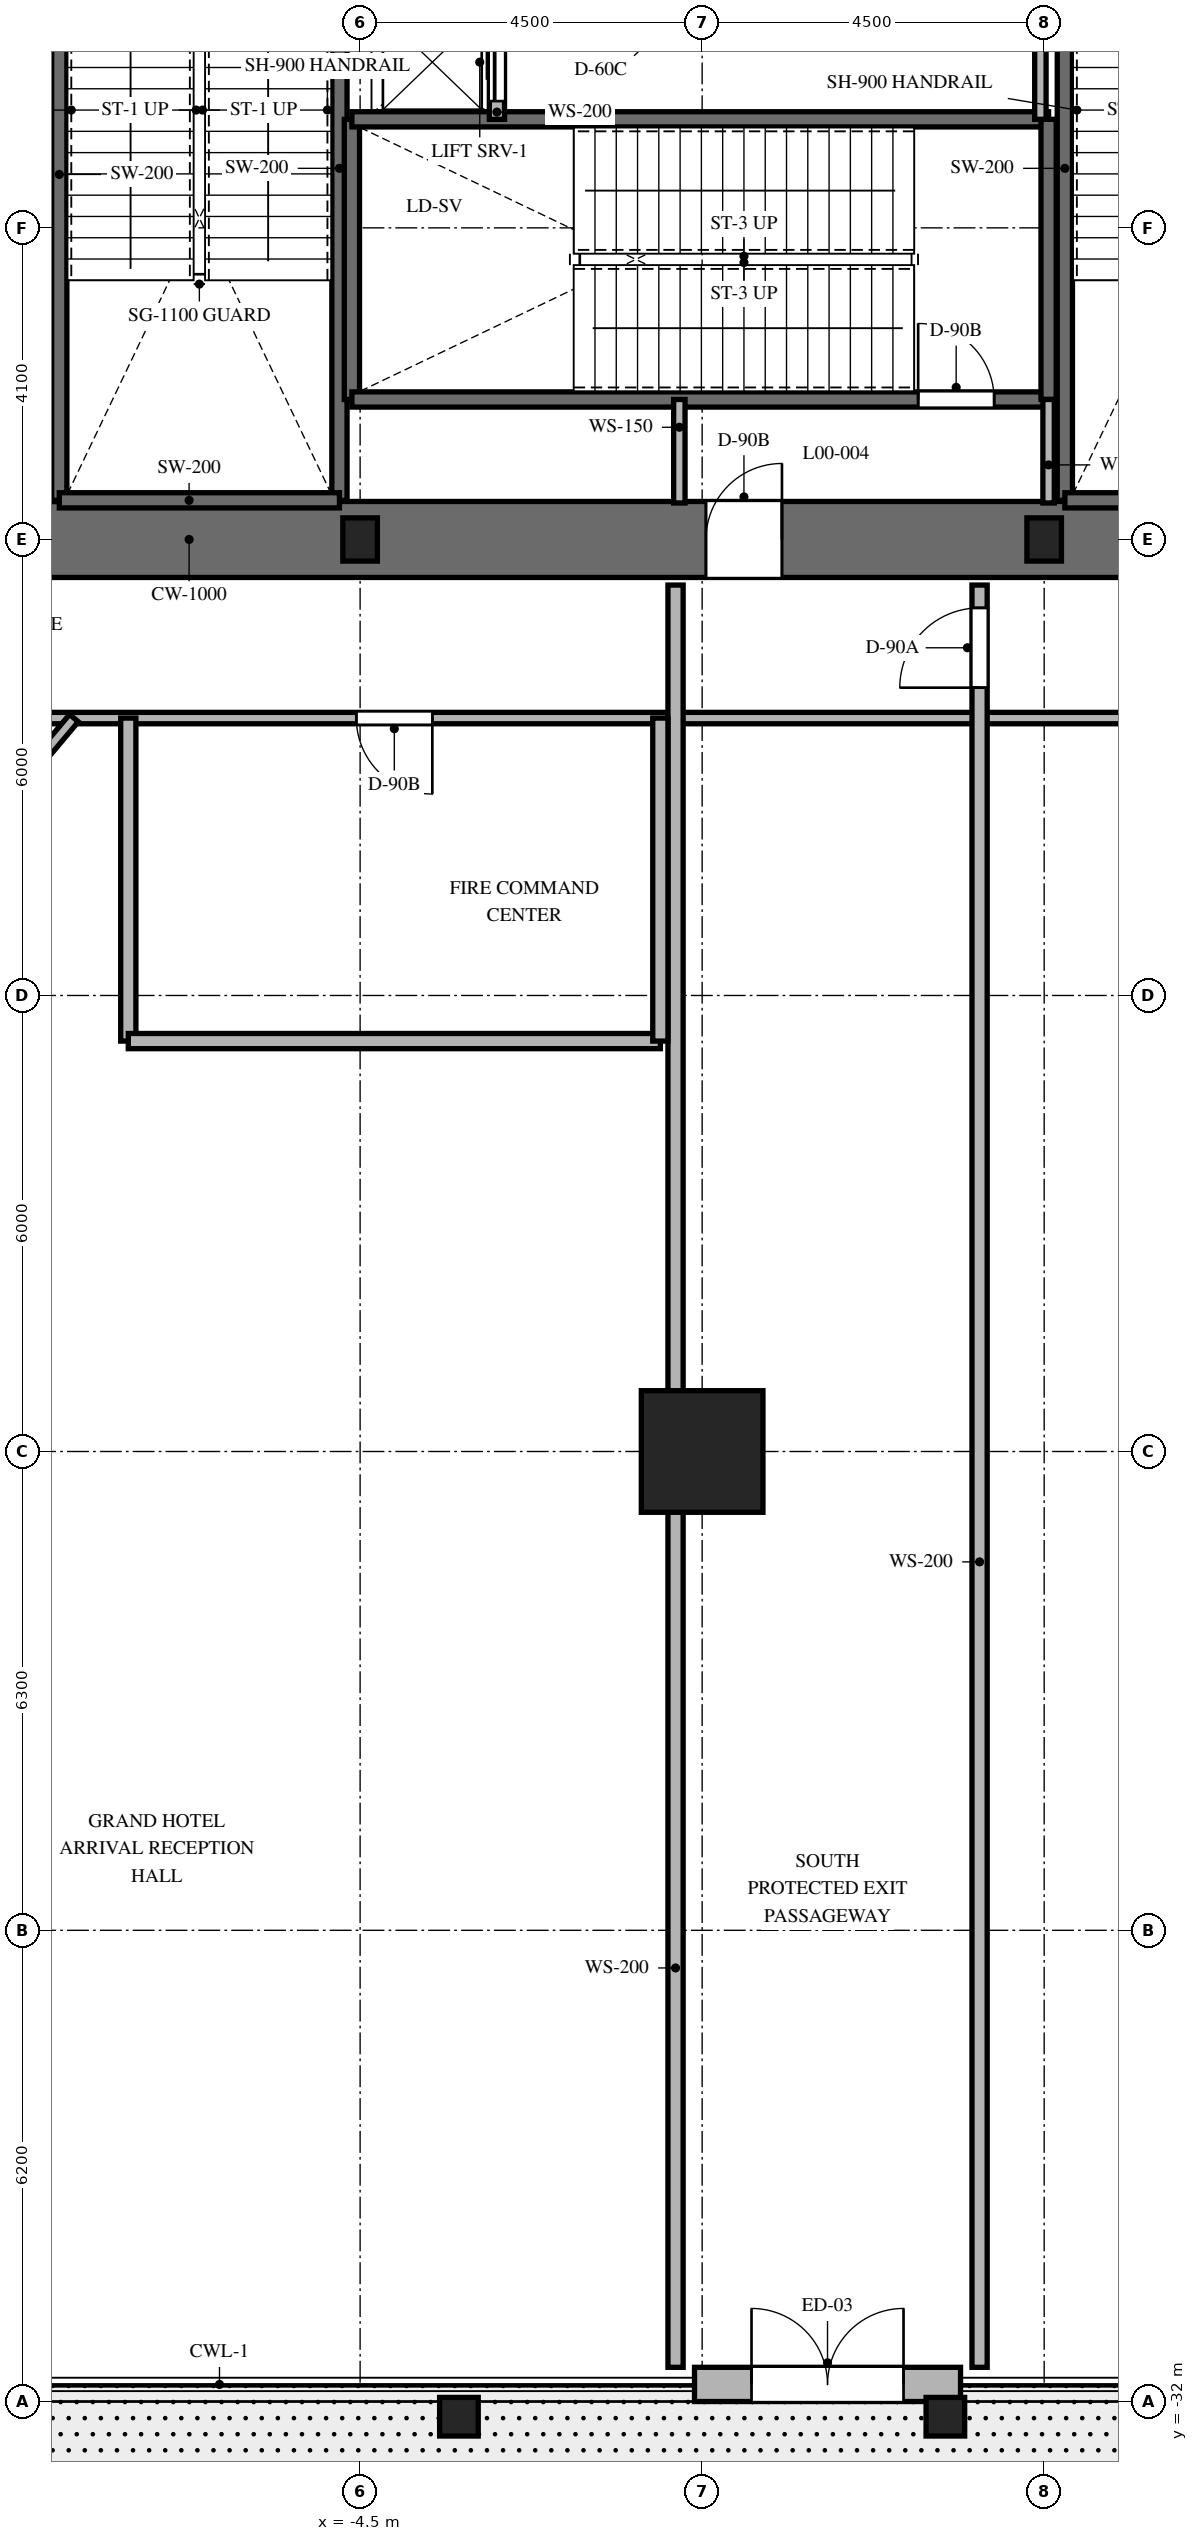
"""IFC4 building model, lengths in metres.
Left out: names, types, materials, properties, quantities, classifications, styles, units other than length and angle.
Written with IfcOpenShell. Run it as: python <this file> out.ifc"""

import sys

from ifc_helpers import new_model, si_unit, direction, frame, frame_2d, origin, origin_2d, place, context, subcontext, project, spatial, rectangle, hollow_circle, i_section, extrude, element, fill, save


model = new_model("IFC4")
c1 = context("Model", 3, precision=1e-05, world=origin(), true_north=direction((0.0, 1.0)))
c2 = subcontext(c1, "Body", "Model", "MODEL_VIEW")
j1 = project(units=[si_unit("LENGTHUNIT", "METRE"), si_unit("PLANEANGLEUNIT", "RADIAN")], contexts=[c1])
p1 = place(None, origin())
s1 = spatial("IfcSite", under=j1, at=p1, CompositionType="ELEMENT")
p2 = place(p1, origin())
s2 = spatial("IfcBuilding", under=s1, at=p2, CompositionType="ELEMENT")
p3 = place(p2, origin())
s3 = spatial("IfcBuildingStorey", under=s2, at=p3, CompositionType="ELEMENT", Elevation=0.0)
for number, where, z_axis, x_axis in (
    (1, (-3.2, -32.2, 0.0), (0.0, 0.0, 1.0), (1.0, 0.0, 0.0)),
    (2, (3.2, -32.2, 0.0), (0.0, 0.0, 1.0), (1.0, 0.0, 0.0)),
):
    element("IfcColumn", number, at=place(p3, frame(where, z_axis=z_axis, x_axis=x_axis)), inside=s3, PredefinedType="COLUMN", context=c2, shape_type="SweptSolid", body=[
        extrude(hollow_circle(Radius=0.254, WallThickness=0.02, at=origin_2d()), origin(), (0.0, 0.0, 1.0), 5.2),
    ])
p4 = place(p3, frame((-9.5, -7.5, 0.0), z_axis=(0.0, 0.0, 1.0), x_axis=(1.0, 0.0, 0.0)))
e3 = element("IfcWall", 3, at=p4, inside=s3, PredefinedType="SHEAR", context=c2, shape_type="SweptSolid", body=[
    extrude(rectangle(XDim=19.0, YDim=1.0, at=frame_2d((9.5, 0.0))), origin(), (0.0, 0.0, 1.0), 6.0),
])
p5 = place(p4, frame((9.55, 0.0, 0.0)))
e4 = element("IfcOpeningElement", 4, at=p5, cuts=e3, PredefinedType="OPENING", context=c2, shape_type="SweptSolid", body=[
    extrude(rectangle(XDim=1.0, YDim=2.15, at=frame_2d((0.5, 1.075))), frame((0.0, 0.51, 0.0), z_axis=(0.0, -1.0, 0.0), x_axis=(1.0, 0.0, 0.0)), (0.0, 0.0, 1.0), 1.02),
])
p6 = place(p3, frame((-9.0, -7.0, 0.0), z_axis=(0.0, 0.0, 1.0), x_axis=(0.0, 1.0, 0.0)))
e5 = element("IfcWall", 5, at=p6, inside=s3, PredefinedType="SHEAR", context=c2, shape_type="SweptSolid", body=[
    extrude(rectangle(XDim=14.0, YDim=1.0, at=frame_2d((7.0, 0.0))), origin(), (0.0, 0.0, 1.0), 6.0),
])
p7 = place(p6, frame((10.125, 0.0, 0.0)))
e6 = element("IfcOpeningElement", 6, at=p7, cuts=e5, PredefinedType="OPENING", context=c2, shape_type="SweptSolid", body=[
    extrude(rectangle(XDim=1.05, YDim=2.15, at=frame_2d((0.525, 1.075))), frame((0.0, 0.51, 0.0), z_axis=(0.0, -1.0, 0.0), x_axis=(1.0, 0.0, 0.0)), (0.0, 0.0, 1.0), 1.02),
])
for number, where, z_axis, x_axis in (
    (7, (-8.458, -6.985, 0.0), (0.0, 0.0, 1.0), (0.0, 1.0, 0.0)),
    (8, (-4.772, -6.985, 0.0), (0.0, 0.0, 1.0), (0.0, 1.0, 0.0)),
):
    element("IfcWall", number, at=place(p3, frame(where, z_axis=z_axis, x_axis=x_axis)), inside=s3, PredefinedType="SHEAR", context=c2, shape_type="SweptSolid", body=[
        extrude(rectangle(XDim=9.143, YDim=0.2, at=frame_2d((4.572, 0.0))), origin(), (0.0, 0.0, 1.0), 6.0),
    ])
p8 = place(p3, frame((-8.458, -6.985, 0.0), z_axis=(0.0, 0.0, 1.0), x_axis=(1.0, 0.0, 0.0)))
e9 = element("IfcWall", 9, at=p8, inside=s3, PredefinedType="SHEAR", context=c2, shape_type="SweptSolid", body=[
    extrude(rectangle(XDim=3.686, YDim=0.2, at=frame_2d((1.843, 0.0))), origin(), (0.0, 0.0, 1.0), 6.0),
])
p9 = place(p3, frame((4.772, -6.985, 0.0), z_axis=(0.0, 0.0, 1.0), x_axis=(0.0, 1.0, 0.0)))
e10 = element("IfcWall", 10, at=p9, inside=s3, PredefinedType="SHEAR", context=c2, shape_type="SweptSolid", body=[
    extrude(rectangle(XDim=9.143, YDim=0.2, at=frame_2d((4.572, 0.0))), origin(), (0.0, 0.0, 1.0), 6.0),
])
for number, where, z_axis, x_axis in (
    (11, (4.772, -6.985, 0.0), (0.0, 0.0, 1.0), (1.0, 0.0, 0.0)),
    (12, (-4.608, -5.658, 0.0), (0.0, 0.0, 1.0), (0.0, 1.0, 0.0)),
):
    element("IfcWall", number, at=place(p3, frame(where, z_axis=z_axis, x_axis=x_axis)), inside=s3, PredefinedType="SHEAR", context=c2, shape_type="SweptSolid", body=[
        extrude(rectangle(XDim=3.686, YDim=0.2, at=frame_2d((1.843, 0.0))), origin(), (0.0, 0.0, 1.0), 6.0),
    ])
p10 = place(p3, frame((-4.608, -5.658, 0.0), z_axis=(0.0, 0.0, 1.0), x_axis=(1.0, 0.0, 0.0)))
e13 = element("IfcWall", 13, at=p10, inside=s3, PredefinedType="SHEAR", context=c2, shape_type="SweptSolid", body=[
    extrude(rectangle(XDim=9.166, YDim=0.2, at=frame_2d((4.583, 0.0))), origin(), (0.0, 0.0, 1.0), 6.0),
])
p11 = place(p10, frame((7.45, 0.0, 0.0)))
e14 = element("IfcOpeningElement", 14, at=p11, cuts=e13, PredefinedType="OPENING", context=c2, shape_type="SweptSolid", body=[
    extrude(rectangle(XDim=1.0, YDim=2.15, at=frame_2d((0.5, 1.075))), frame((0.0, 0.11, 0.0), z_axis=(0.0, -1.0, 0.0), x_axis=(1.0, 0.0, 0.0)), (0.0, 0.0, 1.0), 0.22),
])
p12 = place(p3, frame((-4.608, -1.972, 0.0), z_axis=(0.0, 0.0, 1.0), x_axis=(1.0, 0.0, 0.0)))
e15 = element("IfcWall", 15, at=p12, inside=s3, PredefinedType="SHEAR", context=c2, shape_type="SweptSolid", body=[
    extrude(rectangle(XDim=9.166, YDim=0.2, at=frame_2d((4.583, 0.0))), origin(), (0.0, 0.0, 1.0), 6.0),
])
p13 = place(p3, frame((4.558, -5.658, 0.0), z_axis=(0.0, 0.0, 1.0), x_axis=(0.0, 1.0, 0.0)))
e16 = element("IfcWall", 16, at=p13, inside=s3, PredefinedType="SHEAR", context=c2, shape_type="SweptSolid", body=[
    extrude(rectangle(XDim=3.686, YDim=0.2, at=frame_2d((1.843, 0.0))), origin(), (0.0, 0.0, 1.0), 6.0),
])
for number, where, z_axis, x_axis in (
    (17, (-4.5, -7.5, 0.0), (0.0, 0.0, 1.0), (1.0, 0.0, 0.0)),
    (18, (4.5, -7.5, 0.0), (0.0, 0.0, 1.0), (1.0, 0.0, 0.0)),
):
    element("IfcColumn", number, at=place(p3, frame(where, z_axis=z_axis, x_axis=x_axis)), inside=s3, PredefinedType="COLUMN", context=c2, shape_type="SweptSolid", body=[
        extrude(i_section(OverallWidth=0.454, OverallDepth=0.569, WebThickness=0.078, FlangeThickness=0.125, at=origin_2d()), origin(), (0.0, 0.0, 1.0), 6.0),
    ])
p14 = place(p3, frame((0.0, -19.5, 0.0), z_axis=(0.0, 0.0, 1.0), x_axis=(1.0, 0.0, 0.0)))
e19 = element("IfcColumn", 19, at=p14, inside=s3, PredefinedType="COLUMN", context=c2, shape_type="SweptSolid", body=[
    extrude(rectangle(XDim=1.6, YDim=1.6, at=origin_2d()), origin(), (0.0, 0.0, 1.0), 6.0),
])
p15 = place(p3, frame((-0.101, -31.775, 0.0), z_axis=(0.0, 0.0, 1.0), x_axis=(1.0, 0.0, 0.0)))
e20 = element("IfcWall", 20, at=p15, inside=s3, PredefinedType="SOLIDWALL", context=c2, shape_type="SweptSolid", body=[
    extrude(rectangle(XDim=3.5, YDim=0.45, at=frame_2d((1.75, 0.0))), origin(), (0.0, 0.0, 1.0), 4.65),
])
p16 = place(p15, frame((0.75, 0.0, 0.0)))
e21 = element("IfcOpeningElement", 21, at=p16, cuts=e20, PredefinedType="OPENING", context=c2, shape_type="SweptSolid", body=[
    extrude(rectangle(XDim=2.0, YDim=2.4, at=frame_2d((1.0, 1.2))), frame((0.0, 0.235, 0.0), z_axis=(0.0, -1.0, 0.0), x_axis=(1.0, 0.0, 0.0)), (0.0, 0.0, 1.0), 0.47),
])
for number, where, z_axis, x_axis in (
    (22, (-0.3, -7.02, 0.0), (0.0, 0.0, 1.0), (0.0, 1.0, 0.0)),
    (23, (4.558, -7.02, 0.0), (0.0, 0.0, 1.0), (0.0, 1.0, 0.0)),
):
    element("IfcWall", number, at=place(p3, frame(where, z_axis=z_axis, x_axis=x_axis)), inside=s3, PredefinedType="PARTITIONING", context=c2, shape_type="SweptSolid", body=[
        extrude(rectangle(XDim=1.362, YDim=0.15, at=frame_2d((0.681, 0.0))), origin(), (0.0, 0.0, 1.0), 5.68),
    ])
p17 = place(p3, frame((-2.7, -1.972, 0.0), z_axis=(0.0, 0.0, 1.0), x_axis=(0.0, 1.0, 0.0)))
e24 = element("IfcWall", 24, at=p17, inside=s3, PredefinedType="PARTITIONING", context=c2, shape_type="SweptSolid", body=[
    extrude(rectangle(XDim=1.472, YDim=0.2, at=frame_2d((0.736, 0.0))), origin(), (0.0, 0.0, 1.0), 5.68),
])
p18 = place(p17, frame((0.24, 0.0, 0.0)))
e25 = element("IfcOpeningElement", 25, at=p18, cuts=e24, PredefinedType="OPENING", context=c2, shape_type="SweptSolid", body=[
    extrude(rectangle(XDim=1.0, YDim=2.2, at=frame_2d((0.5, 1.1))), frame((0.0, 0.11, 0.0), z_axis=(0.0, -1.0, 0.0), x_axis=(1.0, 0.0, 0.0)), (0.0, 0.0, 1.0), 0.22),
])
p19 = place(p3, frame((4.45, -1.972, 0.0), z_axis=(0.0, 0.0, 1.0), x_axis=(0.0, 1.0, 0.0)))
e26 = element("IfcWall", 26, at=p19, inside=s3, PredefinedType="PARTITIONING", context=c2, shape_type="SweptSolid", body=[
    extrude(rectangle(XDim=4.222, YDim=0.15, at=frame_2d((2.111, 0.0))), origin(), (0.0, 0.0, 1.0), 5.68),
])
p20 = place(p3, frame((11.35, -9.85, 0.0), z_axis=(0.0, 0.0, 1.0), x_axis=(-1.0, 0.0, 0.0)))
e27 = element("IfcWall", 27, at=p20, inside=s3, PredefinedType="PARTITIONING", context=c2, shape_type="SweptSolid", body=[
    extrude(rectangle(XDim=22.7, YDim=0.15, at=frame_2d((11.35, 0.0))), origin(), (0.0, 0.0, 1.0), 4.722),
])
p21 = place(p20, frame((14.9, 0.0, 0.0)))
e28 = element("IfcOpeningElement", 28, at=p21, cuts=e27, PredefinedType="OPENING", context=c2, shape_type="SweptSolid", body=[
    extrude(rectangle(XDim=1.0, YDim=2.15, at=frame_2d((0.5, 1.075))), frame((0.0, 0.085, 0.0), z_axis=(0.0, -1.0, 0.0), x_axis=(1.0, 0.0, 0.0)), (0.0, 0.0, 1.0), 0.17),
])
p22 = place(p3, frame((-0.35, -31.55, 0.0), z_axis=(0.0, 0.0, 1.0), x_axis=(0.0, 1.0, 0.0)))
e29 = element("IfcWall", 29, at=p22, inside=s3, PredefinedType="PARTITIONING", context=c2, shape_type="SweptSolid", body=[
    extrude(rectangle(XDim=23.45, YDim=0.2, at=frame_2d((11.725, 0.0))), origin(), (0.0, 0.0, 1.0), 4.729),
])
p23 = place(p3, frame((3.65, -31.55, 0.0), z_axis=(0.0, 0.0, 1.0), x_axis=(0.0, 1.0, 0.0)))
e30 = element("IfcWall", 30, at=p23, inside=s3, PredefinedType="PARTITIONING", context=c2, shape_type="SweptSolid", body=[
    extrude(rectangle(XDim=23.45, YDim=0.2, at=frame_2d((11.725, 0.0))), origin(), (0.0, 0.0, 1.0), 4.729),
])
p24 = place(p23, frame((22.1, 0.0, 0.0)))
e31 = element("IfcOpeningElement", 31, at=p24, cuts=e30, PredefinedType="OPENING", context=c2, shape_type="SweptSolid", body=[
    extrude(rectangle(XDim=1.05, YDim=2.15, at=frame_2d((0.525, 1.075))), frame((0.0, 0.11, 0.0), z_axis=(0.0, -1.0, 0.0), x_axis=(1.0, 0.0, 0.0)), (0.0, 0.0, 1.0), 0.22),
])
p25 = place(p3, frame((-7.55, -14.1, 0.0), z_axis=(0.0, 0.0, 1.0), x_axis=(0.0, 1.0, 0.0)))
e32 = element("IfcWall", 32, at=p25, inside=s3, PredefinedType="PARTITIONING", context=c2, shape_type="SweptSolid", body=[
    extrude(rectangle(XDim=4.25, YDim=0.2, at=frame_2d((2.125, 0.0))), origin(), (0.0, 0.0, 1.0), 5.68),
])
p26 = place(p3, frame((-7.55, -14.1, 0.0), z_axis=(0.0, 0.0, 1.0), x_axis=(1.0, 0.0, 0.0)))
e33 = element("IfcWall", 33, at=p26, inside=s3, PredefinedType="PARTITIONING", context=c2, shape_type="SweptSolid", body=[
    extrude(rectangle(XDim=7.0, YDim=0.2, at=frame_2d((3.5, 0.0))), origin(), (0.0, 0.0, 1.0), 5.68),
])
p27 = place(p3, frame((-0.55, -14.1, 0.0), z_axis=(0.0, 0.0, 1.0), x_axis=(0.0, 1.0, 0.0)))
e34 = element("IfcWall", 34, at=p27, inside=s3, PredefinedType="PARTITIONING", context=c2, shape_type="SweptSolid", body=[
    extrude(rectangle(XDim=4.25, YDim=0.2, at=frame_2d((2.125, 0.0))), origin(), (0.0, 0.0, 1.0), 5.68),
])
p28 = place(p3, frame((-8.265, -9.85, 0.0), z_axis=(0.0, 0.0, 1.0), x_axis=(-0.642790692764, -0.766041856099, 0.0)))
e35 = element("IfcWall", 35, at=p28, inside=s3, PredefinedType="PARTITIONING", context=c2, shape_type="SweptSolid", body=[
    extrude(rectangle(XDim=23.784, YDim=0.15, at=frame_2d((11.892, 0.0))), origin(), (0.0, 0.0, 1.0), 4.67),
])
p29 = place(p16, origin())
e36 = element("IfcDoor", 36, at=p29, inside=s3, OperationType="DOUBLE_SWING_LEFT", PredefinedType="DOOR", context=c2, shape_type="SweptSolid", body=[
    extrude(rectangle(XDim=2.0, YDim=2.4, at=frame_2d((1.0, 1.2))), frame((0.0, 0.025, 0.0), z_axis=(0.0, -1.0, 0.0), x_axis=(1.0, 0.0, 0.0)), (0.0, 0.0, 1.0), 0.05),
])
fill(e21, e36)
p30 = place(p11, origin())
e37 = element("IfcDoor", 37, at=p30, inside=s3, OperationType="SINGLE_SWING_LEFT", PredefinedType="DOOR", context=c2, shape_type="SweptSolid", body=[
    extrude(rectangle(XDim=1.0, YDim=2.15, at=frame_2d((0.5, 1.075))), frame((0.0, 0.025, 0.0), z_axis=(0.0, -1.0, 0.0), x_axis=(1.0, 0.0, 0.0)), (0.0, 0.0, 1.0), 0.05),
])
fill(e14, e37)
p31 = place(p5, origin())
e38 = element("IfcDoor", 38, at=p31, inside=s3, OperationType="SINGLE_SWING_RIGHT", PredefinedType="DOOR", context=c2, shape_type="SweptSolid", body=[
    extrude(rectangle(XDim=1.0, YDim=2.15, at=frame_2d((0.5, 1.075))), frame((0.0, 0.025, 0.0), z_axis=(0.0, -1.0, 0.0), x_axis=(1.0, 0.0, 0.0)), (0.0, 0.0, 1.0), 0.05),
])
fill(e4, e38)
p32 = place(p18, origin())
e39 = element("IfcDoor", 39, at=p32, inside=s3, OperationType="SLIDING_TO_LEFT", PredefinedType="DOOR", context=c2, shape_type="SweptSolid", body=[
    extrude(rectangle(XDim=1.0, YDim=2.2, at=frame_2d((0.5, 1.1))), frame((0.0, 0.025, 0.0), z_axis=(0.0, -1.0, 0.0), x_axis=(1.0, 0.0, 0.0)), (0.0, 0.0, 1.0), 0.05),
])
fill(e25, e39)
p33 = place(p24, origin())
e40 = element("IfcDoor", 40, at=p33, inside=s3, OperationType="SINGLE_SWING_LEFT", PredefinedType="DOOR", context=c2, shape_type="SweptSolid", body=[
    extrude(rectangle(XDim=1.05, YDim=2.15, at=frame_2d((0.525, 1.075))), frame((0.0, 0.025, 0.0), z_axis=(0.0, -1.0, 0.0), x_axis=(1.0, 0.0, 0.0)), (0.0, 0.0, 1.0), 0.05),
])
fill(e31, e40)
p34 = place(p21, origin())
e41 = element("IfcDoor", 41, at=p34, inside=s3, OperationType="SINGLE_SWING_LEFT", PredefinedType="DOOR", context=c2, shape_type="SweptSolid", body=[
    extrude(rectangle(XDim=1.0, YDim=2.15, at=frame_2d((0.5, 1.075))), frame((0.0, 0.025, 0.0), z_axis=(0.0, -1.0, 0.0), x_axis=(1.0, 0.0, 0.0)), (0.0, 0.0, 1.0), 0.05),
])
fill(e28, e41)
save(model, sys.argv[1])
